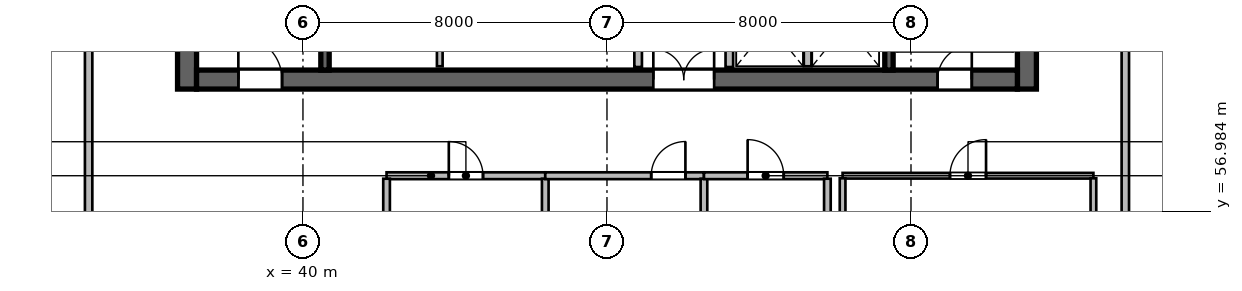
"""IFC4 building model, lengths in metres.
Left out: names, types, materials, properties, quantities, classifications, styles, units other than length and angle.
Written with IfcOpenShell. Run it as: python <this file> out.ifc"""

import sys

from ifc_helpers import new_model, si_unit, direction, frame, frame_2d, origin, place, context, subcontext, project, spatial, rectangle, extrude, source, transform, mapped, element, fill, save


model = new_model("IFC4")
c1 = context("Model", 3, precision=1e-05, world=origin(), true_north=direction((0.0, 1.0)))
c2 = subcontext(c1, "Body", "Model", "MODEL_VIEW")
j1 = project(units=[si_unit("LENGTHUNIT", "METRE"), si_unit("PLANEANGLEUNIT", "RADIAN")], contexts=[c1])
p1 = place(None, origin())
s1 = spatial("IfcSite", under=j1, at=p1, CompositionType="ELEMENT")
p2 = place(p1, origin())
s2 = spatial("IfcBuilding", under=s1, at=p2, CompositionType="ELEMENT")
p3 = place(p2, frame((0.0, 0.0, 107.7)))
s3 = spatial("IfcBuildingStorey", under=s2, at=p3, CompositionType="ELEMENT", Elevation=107.7)
m1 = source(origin(), c2, "Body", "SweptSolid", [
    extrude(rectangle(XDim=12.0, YDim=0.5, at=frame_2d((6.0, 0.0))), origin(), (0.0, 0.0, 1.0), 3.9),
])
for number, where, z_axis, x_axis in (
    (1, (36.95, 60.2, 0.0), (0.0, 0.0, 1.0), (0.0, 1.0, 0.0)),
    (2, (59.05, 60.2, 0.0), (0.0, 0.0, 1.0), (0.0, 1.0, 0.0)),
):
    element("IfcWall", number, at=place(p3, frame(where, z_axis=z_axis, x_axis=x_axis)), inside=s3, PredefinedType="SHEAR", context=c2, shape_type="MappedRepresentation", body=[
        mapped(m1, transform((0.0, 0.0, 0.0), scale=1.0)),
    ])
m2 = source(origin(), c2, "Body", "SweptSolid", [
    extrude(rectangle(XDim=21.6, YDim=0.5, at=frame_2d((10.8, 0.0))), origin(), (0.0, 0.0, 1.0), 3.9),
])
p4 = place(p3, frame((37.2, 60.45, 0.0), z_axis=(0.0, 0.0, 1.0), x_axis=(1.0, 0.0, 0.0)))
e3 = element("IfcWall", 3, at=p4, inside=s3, PredefinedType="SHEAR", context=c2, shape_type="MappedRepresentation", body=[
    mapped(m2, transform((0.0, 0.0, 0.0), scale=1.0)),
])
p5 = place(p4, frame((1.1, 0.0, 0.0)))
e4 = element("IfcOpeningElement", 4, at=p5, cuts=e3, PredefinedType="OPENING", context=c2, shape_type="SweptSolid", body=[
    extrude(rectangle(XDim=1.15, YDim=2.15, at=frame_2d((0.575, 1.075))), frame((0.0, 0.26, 0.0), z_axis=(0.0, -1.0, 0.0), x_axis=(1.0, 0.0, 0.0)), (0.0, 0.0, 1.0), 0.52),
])
p6 = place(p4, frame((19.5, 0.0, 0.0)))
e5 = element("IfcOpeningElement", 5, at=p6, cuts=e3, PredefinedType="OPENING", context=c2, shape_type="SweptSolid", body=[
    extrude(rectangle(XDim=0.9, YDim=2.1, at=frame_2d((0.45, 1.05))), frame((0.0, 0.26, 0.0), z_axis=(0.0, -1.0, 0.0), x_axis=(1.0, 0.0, 0.0)), (0.0, 0.0, 1.0), 0.52),
])
p7 = place(p4, frame((12.02, 0.0, 0.0)))
e6 = element("IfcOpeningElement", 6, at=p7, cuts=e3, PredefinedType="OPENING", context=c2, shape_type="SweptSolid", body=[
    extrude(rectangle(XDim=1.6, YDim=2.15, at=frame_2d((0.8, 1.075))), frame((0.0, 0.26, 0.0), z_axis=(0.0, -1.0, 0.0), x_axis=(1.0, 0.0, 0.0)), (0.0, 0.0, 1.0), 0.52),
])
m3 = source(origin(), c2, "Body", "SweptSolid", [
    extrude(rectangle(XDim=11.0, YDim=0.22, at=frame_2d((5.5, 0.0))), origin(), (0.0, 0.0, 1.0), 3.9),
])
p8 = place(p3, frame((40.58, 60.7, 0.0), z_axis=(0.0, 0.0, 1.0), x_axis=(0.0, 1.0, 0.0)))
e7 = element("IfcWall", 7, at=p8, inside=s3, PredefinedType="SHEAR", context=c2, shape_type="MappedRepresentation", body=[
    mapped(m3, transform((0.0, 0.0, 0.0), scale=1.0)),
])
p9 = place(p3, frame((55.42, 60.7, 0.0), z_axis=(0.0, 0.0, 1.0), x_axis=(0.0, 1.0, 0.0)))
e8 = element("IfcWall", 8, at=p9, inside=s3, PredefinedType="SHEAR", context=c2, shape_type="MappedRepresentation", body=[
    mapped(m3, transform((0.0, 0.0, 0.0), scale=1.0)),
])
p10 = place(p9, frame((9.545, 0.0, 0.0)))
e9 = element("IfcOpeningElement", 9, at=p10, cuts=e8, PredefinedType="OPENING", context=c2, shape_type="SweptSolid", body=[
    extrude(rectangle(XDim=1.15, YDim=2.15, at=frame_2d((0.575, 1.075))), frame((0.0, 0.12, 0.0), z_axis=(0.0, -1.0, 0.0), x_axis=(1.0, 0.0, 0.0)), (0.0, 0.0, 1.0), 0.24),
])
m4 = source(origin(), c2, "Body", "SweptSolid", [
    extrude(rectangle(XDim=2.24, YDim=0.2, at=frame_2d((1.12, 0.0))), origin(), (0.0, 0.0, 1.0), 3.65),
])
for number, where, z_axis, x_axis in (
    (10, (48.82, 60.78, 0.0), (0.0, 0.0, 1.0), (0.0, 1.0, 0.0)),
    (11, (51.22, 60.78, 0.0), (0.0, 0.0, 1.0), (0.0, 1.0, 0.0)),
):
    element("IfcWall", number, at=place(p3, frame(where, z_axis=z_axis, x_axis=x_axis)), inside=s3, PredefinedType="SOLIDWALL", context=c2, shape_type="MappedRepresentation", body=[
        mapped(m4, transform((0.0, 0.0, 0.0), scale=1.0)),
    ])
m5 = source(origin(), c2, "Body", "SweptSolid", [
    extrude(rectangle(XDim=2.2, YDim=0.15, at=frame_2d((1.1, 0.0))), origin(), (0.0, 0.0, 1.0), 3.65),
])
p11 = place(p3, frame((43.6, 60.8, 0.0), z_axis=(0.0, 0.0, 1.0), x_axis=(0.0, 1.0, 0.0)))
e12 = element("IfcWall", 12, at=p11, inside=s3, PredefinedType="PARTITIONING", context=c2, shape_type="MappedRepresentation", body=[
    mapped(m5, transform((0.0, 0.0, 0.0), scale=1.0)),
])
m6 = source(origin(), c2, "Body", "SweptSolid", [
    extrude(rectangle(XDim=2.2, YDim=0.2, at=frame_2d((1.1, 0.0))), origin(), (0.0, 0.0, 1.0), 3.65),
])
p12 = place(p3, frame((53.28, 60.8, 0.0), z_axis=(0.0, 0.0, 1.0), x_axis=(0.0, 1.0, 0.0)))
e13 = element("IfcWall", 13, at=p12, inside=s3, PredefinedType="SOLIDWALL", context=c2, shape_type="MappedRepresentation", body=[
    mapped(m6, transform((0.0, 0.0, 0.0), scale=1.0)),
])
m7 = source(origin(), c2, "Body", "SweptSolid", [
    extrude(rectangle(XDim=4.176, YDim=0.18, at=frame_2d((2.088, 0.0))), origin(), (0.0, 0.0, 1.0), 3.65),
])
p13 = place(p3, frame((42.2, 57.92, 0.0), z_axis=(0.0, 0.0, 1.0), x_axis=(1.0, 0.0, 0.0)))
e14 = element("IfcWall", 14, at=p13, inside=s3, PredefinedType="PLUMBINGWALL", context=c2, shape_type="MappedRepresentation", body=[
    mapped(m7, transform((0.0, 0.0, 0.0), scale=1.0)),
])
p14 = place(p13, frame((1.638, 0.0, 0.0)))
e15 = element("IfcOpeningElement", 15, at=p14, cuts=e14, PredefinedType="OPENING", context=c2, shape_type="SweptSolid", body=[
    extrude(rectangle(XDim=0.9, YDim=2.08, at=frame_2d((0.45, 1.04))), frame((0.0, 0.1, 0.0), z_axis=(0.0, -1.0, 0.0), x_axis=(1.0, 0.0, 0.0)), (0.0, 0.0, 1.0), 0.2),
])
m8 = source(origin(), c2, "Body", "SweptSolid", [
    extrude(rectangle(XDim=3.763, YDim=0.175, at=frame_2d((1.881, 0.0))), origin(), (0.0, 0.0, 1.0), 3.65),
])
for number, where, z_axis, x_axis in (
    (16, (42.2, 54.079, 0.0), (0.0, 0.0, 1.0), (0.0, 1.0, 0.0)),
    (17, (46.376, 54.079, 0.0), (0.0, 0.0, 1.0), (0.0, 1.0, 0.0)),
):
    element("IfcWall", number, at=place(p3, frame(where, z_axis=z_axis, x_axis=x_axis)), inside=s3, PredefinedType="PARTITIONING", context=c2, shape_type="MappedRepresentation", body=[
        mapped(m8, transform((0.0, 0.0, 0.0), scale=1.0)),
    ])
p15 = place(p3, frame((46.376, 57.92, 0.0), z_axis=(0.0, 0.0, 1.0), x_axis=(1.0, 0.0, 0.0)))
e18 = element("IfcWall", 18, at=p15, inside=s3, PredefinedType="PLUMBINGWALL", context=c2, shape_type="MappedRepresentation", body=[
    mapped(m7, transform((0.0, 0.0, 0.0), scale=1.0)),
])
p16 = place(p15, frame((2.788, 0.0, 0.0)))
e19 = element("IfcOpeningElement", 19, at=p16, cuts=e18, PredefinedType="OPENING", context=c2, shape_type="SweptSolid", body=[
    extrude(rectangle(XDim=0.9, YDim=2.08, at=frame_2d((0.45, 1.04))), frame((0.0, 0.1, 0.0), z_axis=(0.0, -1.0, 0.0), x_axis=(1.0, 0.0, 0.0)), (0.0, 0.0, 1.0), 0.2),
])
p17 = place(p3, frame((50.552, 54.079, 0.0), z_axis=(0.0, 0.0, 1.0), x_axis=(0.0, 1.0, 0.0)))
e20 = element("IfcWall", 20, at=p17, inside=s3, PredefinedType="PARTITIONING", context=c2, shape_type="MappedRepresentation", body=[
    mapped(m8, transform((0.0, 0.0, 0.0), scale=1.0)),
])
m9 = source(origin(), c2, "Body", "SweptSolid", [
    extrude(rectangle(XDim=3.248, YDim=0.18, at=frame_2d((1.624, 0.0))), origin(), (0.0, 0.0, 1.0), 3.65),
])
p18 = place(p3, frame((50.552, 57.92, 0.0), z_axis=(0.0, 0.0, 1.0), x_axis=(1.0, 0.0, 0.0)))
e21 = element("IfcWall", 21, at=p18, inside=s3, PredefinedType="PLUMBINGWALL", context=c2, shape_type="MappedRepresentation", body=[
    mapped(m9, transform((0.0, 0.0, 0.0), scale=1.0)),
])
p19 = place(p18, frame((1.149, 0.0, 0.0)))
e22 = element("IfcOpeningElement", 22, at=p19, cuts=e21, PredefinedType="OPENING", context=c2, shape_type="SweptSolid", body=[
    extrude(rectangle(XDim=0.95, YDim=2.12, at=frame_2d((0.475, 1.06))), frame((0.0, 0.1, 0.0), z_axis=(0.0, -1.0, 0.0), x_axis=(1.0, 0.0, 0.0)), (0.0, 0.0, 1.0), 0.2),
])
p20 = place(p3, frame((53.8, 54.079, 0.0), z_axis=(0.0, 0.0, 1.0), x_axis=(0.0, 1.0, 0.0)))
e23 = element("IfcWall", 23, at=p20, inside=s3, PredefinedType="PARTITIONING", context=c2, shape_type="MappedRepresentation", body=[
    mapped(m8, transform((0.0, 0.0, 0.0), scale=1.0)),
])
m10 = source(origin(), c2, "Body", "SweptSolid", [
    extrude(rectangle(XDim=6.6, YDim=0.15, at=frame_2d((3.3, 0.0))), origin(), (0.0, 0.0, 1.0), 3.65),
])
p21 = place(p3, frame((54.2, 57.92, 0.0), z_axis=(0.0, 0.0, 1.0), x_axis=(1.0, 0.0, 0.0)))
e24 = element("IfcWall", 24, at=p21, inside=s3, PredefinedType="PARTITIONING", context=c2, shape_type="MappedRepresentation", body=[
    mapped(m10, transform((0.0, 0.0, 0.0), scale=1.0)),
])
p22 = place(p21, frame((2.825, 0.0, 0.0)))
e25 = element("IfcOpeningElement", 25, at=p22, cuts=e24, PredefinedType="OPENING", context=c2, shape_type="SweptSolid", body=[
    extrude(rectangle(XDim=0.95, YDim=2.1, at=frame_2d((0.475, 1.05))), frame((0.0, 0.085, 0.0), z_axis=(0.0, -1.0, 0.0), x_axis=(1.0, 0.0, 0.0)), (0.0, 0.0, 1.0), 0.17),
])
m11 = source(origin(), c2, "Body", "SweptSolid", [
    extrude(rectangle(XDim=3.785, YDim=0.15, at=frame_2d((1.893, 0.0))), origin(), (0.0, 0.0, 1.0), 3.65),
])
for number, where, z_axis, x_axis in (
    (26, (54.2, 54.067, 0.0), (0.0, 0.0, 1.0), (0.0, 1.0, 0.0)),
    (27, (60.8, 54.067, 0.0), (0.0, 0.0, 1.0), (0.0, 1.0, 0.0)),
):
    element("IfcWall", number, at=place(p3, frame(where, z_axis=z_axis, x_axis=x_axis)), inside=s3, PredefinedType="PARTITIONING", context=c2, shape_type="MappedRepresentation", body=[
        mapped(m11, transform((0.0, 0.0, 0.0), scale=1.0)),
    ])
m12 = source(origin(), c2, "Body", "SweptSolid", [
    extrude(rectangle(XDim=13.988, YDim=0.195, at=frame_2d((6.994, 0.0))), origin(), (0.0, 0.0, 1.0), 3.65),
])
p23 = place(p3, frame((34.36, 47.472, 0.0), z_axis=(0.0, 0.0, 1.0), x_axis=(0.0, 1.0, 0.0)))
e28 = element("IfcWall", 28, at=p23, inside=s3, PredefinedType="PARTITIONING", context=c2, shape_type="MappedRepresentation", body=[
    mapped(m12, transform((0.0, 0.0, 0.0), scale=1.0)),
])
m13 = source(origin(), c2, "Body", "SweptSolid", [
    extrude(rectangle(XDim=13.988, YDim=0.195, at=frame_2d((6.994, 0.0))), origin(), (0.0, 0.0, 1.0), 2.942),
])
p24 = place(p3, frame((61.64, 47.472, 0.0), z_axis=(0.0, 0.0, 1.0), x_axis=(0.0, 1.0, 0.0)))
e29 = element("IfcWall", 29, at=p24, inside=s3, PredefinedType="PARTITIONING", context=c2, shape_type="MappedRepresentation", body=[
    mapped(m13, transform((0.0, 0.0, 0.0), scale=1.0)),
])
m14 = source(origin(), c2, "Body", "SweptSolid", [
    extrude(rectangle(XDim=1.15, YDim=2.15, at=frame_2d((0.575, 1.075))), frame((0.0, 0.025, 0.0), z_axis=(0.0, -1.0, 0.0), x_axis=(1.0, 0.0, 0.0)), (0.0, 0.0, 1.0), 0.05),
])
p25 = place(p5, origin())
e30 = element("IfcDoor", 30, at=p25, inside=s3, OperationType="SINGLE_SWING_LEFT", PredefinedType="DOOR", context=c2, shape_type="MappedRepresentation", body=[
    mapped(m14, transform((0.0, 0.0, 0.0), scale=1.0)),
])
fill(e4, e30)
m15 = source(origin(), c2, "Body", "SweptSolid", [
    extrude(rectangle(XDim=0.9, YDim=2.1, at=frame_2d((0.45, 1.05))), frame((0.0, 0.025, 0.0), z_axis=(0.0, -1.0, 0.0), x_axis=(1.0, 0.0, 0.0)), (0.0, 0.0, 1.0), 0.05),
])
p26 = place(p6, origin())
e31 = element("IfcDoor", 31, at=p26, inside=s3, OperationType="SINGLE_SWING_RIGHT", PredefinedType="DOOR", context=c2, shape_type="MappedRepresentation", body=[
    mapped(m15, transform((0.0, 0.0, 0.0), scale=1.0)),
])
fill(e5, e31)
m16 = source(origin(), c2, "Body", "SweptSolid", [
    extrude(rectangle(XDim=1.6, YDim=2.15, at=frame_2d((0.8, 1.075))), frame((0.0, 0.025, 0.0), z_axis=(0.0, -1.0, 0.0), x_axis=(1.0, 0.0, 0.0)), (0.0, 0.0, 1.0), 0.05),
])
p27 = place(p7, origin())
e32 = element("IfcDoor", 32, at=p27, inside=s3, OperationType="DOUBLE_DOOR_SINGLE_SWING", PredefinedType="DOOR", context=c2, shape_type="MappedRepresentation", body=[
    mapped(m16, transform((0.0, 0.0, 0.0), scale=1.0)),
])
fill(e6, e32)
m17 = source(origin(), c2, "Body", "SweptSolid", [
    extrude(rectangle(XDim=0.9, YDim=2.08, at=frame_2d((0.45, 1.04))), frame((0.0, 0.025, 0.0), z_axis=(0.0, -1.0, 0.0), x_axis=(1.0, 0.0, 0.0)), (0.0, 0.0, 1.0), 0.05),
])
p28 = place(p14, origin())
e33 = element("IfcDoor", 33, at=p28, inside=s3, OperationType="SINGLE_SWING_LEFT", PredefinedType="DOOR", context=c2, shape_type="MappedRepresentation", body=[
    mapped(m17, transform((0.0, 0.0, 0.0), scale=1.0)),
])
fill(e15, e33)
p29 = place(p16, origin())
e34 = element("IfcDoor", 34, at=p29, inside=s3, OperationType="SINGLE_SWING_RIGHT", PredefinedType="DOOR", context=c2, shape_type="MappedRepresentation", body=[
    mapped(m17, transform((0.0, 0.0, 0.0), scale=1.0)),
])
fill(e19, e34)
m18 = source(origin(), c2, "Body", "SweptSolid", [
    extrude(rectangle(XDim=0.95, YDim=2.12, at=frame_2d((0.475, 1.06))), frame((0.0, 0.025, 0.0), z_axis=(0.0, -1.0, 0.0), x_axis=(1.0, 0.0, 0.0)), (0.0, 0.0, 1.0), 0.05),
])
p30 = place(p19, origin())
e35 = element("IfcDoor", 35, at=p30, inside=s3, OperationType="SINGLE_SWING_LEFT", PredefinedType="DOOR", context=c2, shape_type="MappedRepresentation", body=[
    mapped(m18, transform((0.0, 0.0, 0.0), scale=1.0)),
])
fill(e22, e35)
m19 = source(origin(), c2, "Body", "SweptSolid", [
    extrude(rectangle(XDim=0.95, YDim=2.1, at=frame_2d((0.475, 1.05))), frame((0.0, 0.025, 0.0), z_axis=(0.0, -1.0, 0.0), x_axis=(1.0, 0.0, 0.0)), (0.0, 0.0, 1.0), 0.05),
])
p31 = place(p22, origin())
e36 = element("IfcDoor", 36, at=p31, inside=s3, OperationType="SINGLE_SWING_RIGHT", PredefinedType="DOOR", context=c2, shape_type="MappedRepresentation", body=[
    mapped(m19, transform((0.0, 0.0, 0.0), scale=1.0)),
])
fill(e25, e36)
save(model, sys.argv[1])
